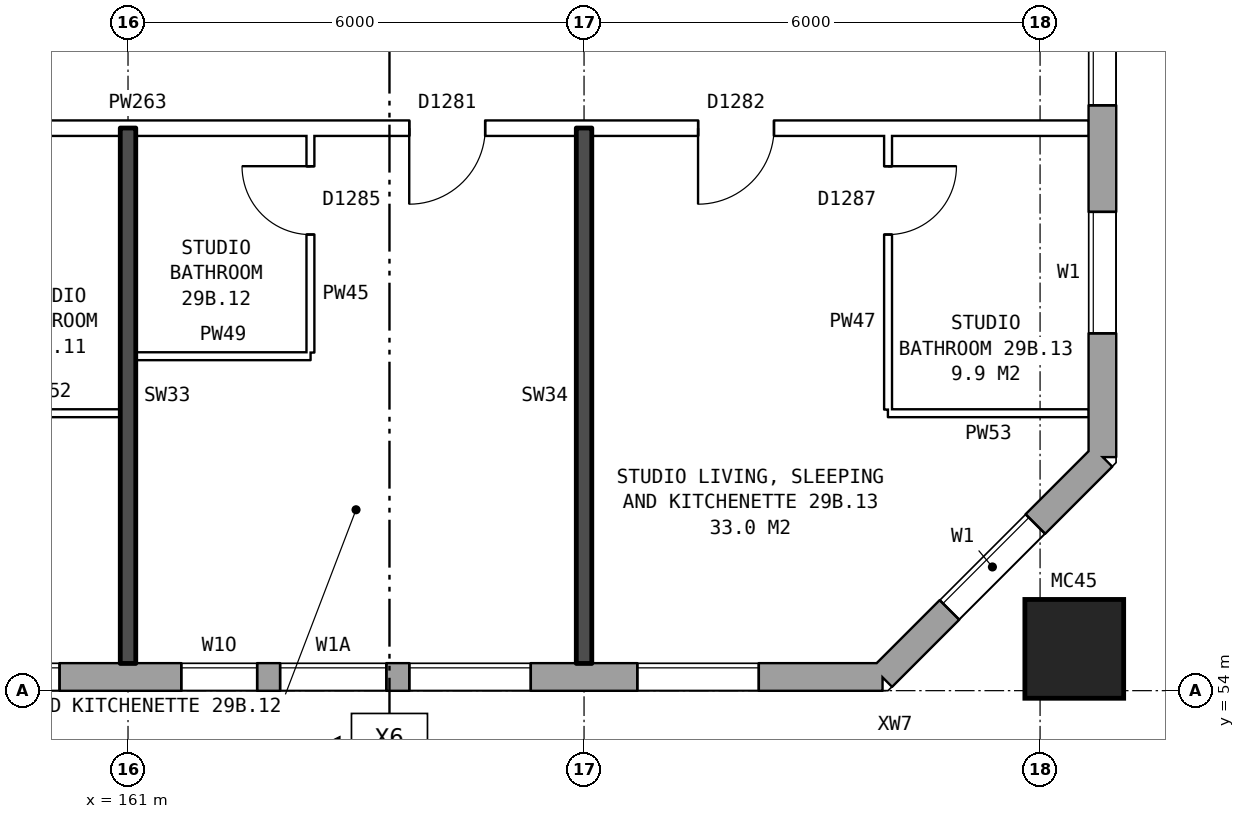
"""IFC4 building model, lengths in metres.
Left out: names, types, materials, properties, quantities, classifications, styles, units other than length and angle.
Written with IfcOpenShell. Run it as: python <this file> out.ifc"""

import sys

from ifc_helpers import new_model, si_unit, direction, frame, frame_2d, origin, origin_2d, place, context, subcontext, project, spatial, rectangle, hollow_rectangle, extrude, element, fill, save


model = new_model("IFC4")
c1 = context("Model", 3, precision=1e-05, world=origin(), true_north=direction((0.0, 1.0)))
c2 = subcontext(c1, "Body", "Model", "MODEL_VIEW")
j1 = project(units=[si_unit("LENGTHUNIT", "METRE"), si_unit("PLANEANGLEUNIT", "RADIAN")], contexts=[c1])
p1 = place(None, origin())
s1 = spatial("IfcSite", under=j1, at=p1, CompositionType="ELEMENT")
p2 = place(p1, origin())
s2 = spatial("IfcBuilding", under=s1, at=p2, CompositionType="ELEMENT")
p3 = place(p2, frame((0.0, 0.0, 105.7)))
s3 = spatial("IfcBuildingStorey", under=s2, at=p3, CompositionType="ELEMENT", Elevation=105.7)
p4 = place(p3, frame((173.45, 54.55, 0.0), z_axis=(0.0, 0.0, 1.0), x_axis=(1.0, 0.0, 0.0)))
e1 = element("IfcColumn", 1, at=p4, inside=s3, PredefinedType="COLUMN", context=c2, shape_type="SweptSolid", body=[
    extrude(hollow_rectangle(XDim=1.3, YDim=1.3, WallThickness=0.07, at=origin_2d()), origin(), (0.0, 0.0, 1.0), 3.1),
])
p5 = place(p3, frame((134.075, 54.18, 0.0), z_axis=(0.0, 0.0, 1.0), x_axis=(1.0, 0.0, 0.0)))
e2 = element("IfcWall", 2, at=p5, inside=s3, PredefinedType="STANDARD", context=c2, shape_type="SweptSolid", body=[
    extrude(rectangle(XDim=36.851, YDim=0.36, at=frame_2d((18.425, 0.0))), origin(), (0.0, 0.0, 1.0), 2.85),
])
p6 = place(p5, frame((0.625, 0.0, 0.8)))
e3 = element("IfcOpeningElement", 3, at=p6, cuts=e2, PredefinedType="OPENING", context=c2, shape_type="SweptSolid", body=[
    extrude(rectangle(XDim=1.6, YDim=1.8, at=frame_2d((0.8, 0.9))), frame((0.0, 0.19, 0.0), z_axis=(0.0, -1.0, 0.0), x_axis=(1.0, 0.0, 0.0)), (0.0, 0.0, 1.0), 0.38),
])
p7 = place(p5, frame((3.625, 0.0, 0.8)))
e4 = element("IfcOpeningElement", 4, at=p7, cuts=e2, PredefinedType="OPENING", context=c2, shape_type="SweptSolid", body=[
    extrude(rectangle(XDim=1.6, YDim=1.8, at=frame_2d((0.8, 0.9))), frame((0.0, 0.19, 0.0), z_axis=(0.0, -1.0, 0.0), x_axis=(1.0, 0.0, 0.0)), (0.0, 0.0, 1.0), 0.38),
])
p8 = place(p5, frame((6.625, 0.0, 0.8)))
e5 = element("IfcOpeningElement", 5, at=p8, cuts=e2, PredefinedType="OPENING", context=c2, shape_type="SweptSolid", body=[
    extrude(rectangle(XDim=1.6, YDim=1.8, at=frame_2d((0.8, 0.9))), frame((0.0, 0.19, 0.0), z_axis=(0.0, -1.0, 0.0), x_axis=(1.0, 0.0, 0.0)), (0.0, 0.0, 1.0), 0.38),
])
p9 = place(p5, frame((9.925, 0.0, 0.15)))
e6 = element("IfcOpeningElement", 6, at=p9, cuts=e2, PredefinedType="OPENING", context=c2, shape_type="SweptSolid", body=[
    extrude(rectangle(XDim=0.6, YDim=0.9, at=frame_2d((0.3, 0.45))), frame((0.0, 0.19, 0.0), z_axis=(0.0, -1.0, 0.0), x_axis=(1.0, 0.0, 0.0)), (0.0, 0.0, 1.0), 0.38),
])
p10 = place(p5, frame((12.625, 0.0, 0.8)))
e7 = element("IfcOpeningElement", 7, at=p10, cuts=e2, PredefinedType="OPENING", context=c2, shape_type="SweptSolid", body=[
    extrude(rectangle(XDim=1.6, YDim=1.8, at=frame_2d((0.8, 0.9))), frame((0.0, 0.19, 0.0), z_axis=(0.0, -1.0, 0.0), x_axis=(1.0, 0.0, 0.0)), (0.0, 0.0, 1.0), 0.38),
])
p11 = place(p5, frame((15.625, 0.0, 0.8)))
e8 = element("IfcOpeningElement", 8, at=p11, cuts=e2, PredefinedType="OPENING", context=c2, shape_type="SweptSolid", body=[
    extrude(rectangle(XDim=1.6, YDim=1.8, at=frame_2d((0.8, 0.9))), frame((0.0, 0.19, 0.0), z_axis=(0.0, -1.0, 0.0), x_axis=(1.0, 0.0, 0.0)), (0.0, 0.0, 1.0), 0.38),
])
p12 = place(p5, frame((18.625, 0.0, 0.8)))
e9 = element("IfcOpeningElement", 9, at=p12, cuts=e2, PredefinedType="OPENING", context=c2, shape_type="SweptSolid", body=[
    extrude(rectangle(XDim=1.6, YDim=1.8, at=frame_2d((0.8, 0.9))), frame((0.0, 0.19, 0.0), z_axis=(0.0, -1.0, 0.0), x_axis=(1.0, 0.0, 0.0)), (0.0, 0.0, 1.0), 0.38),
])
p13 = place(p5, frame((21.625, 0.0, 0.8)))
e10 = element("IfcOpeningElement", 10, at=p13, cuts=e2, PredefinedType="OPENING", context=c2, shape_type="SweptSolid", body=[
    extrude(rectangle(XDim=1.6, YDim=1.8, at=frame_2d((0.8, 0.9))), frame((0.0, 0.19, 0.0), z_axis=(0.0, -1.0, 0.0), x_axis=(1.0, 0.0, 0.0)), (0.0, 0.0, 1.0), 0.38),
])
p14 = place(p5, frame((23.525, 0.0, 0.8)))
e11 = element("IfcOpeningElement", 11, at=p14, cuts=e2, PredefinedType="OPENING", context=c2, shape_type="SweptSolid", body=[
    extrude(rectangle(XDim=1.6, YDim=1.8, at=frame_2d((0.8, 0.9))), frame((0.0, 0.19, 0.0), z_axis=(0.0, -1.0, 0.0), x_axis=(1.0, 0.0, 0.0)), (0.0, 0.0, 1.0), 0.38),
])
p15 = place(p5, frame((27.625, 0.0, 1.4)))
e12 = element("IfcOpeningElement", 12, at=p15, cuts=e2, PredefinedType="OPENING", context=c2, shape_type="SweptSolid", body=[
    extrude(rectangle(XDim=1.0, YDim=1.2, at=frame_2d((0.5, 0.6))), frame((0.0, 0.19, 0.0), z_axis=(0.0, -1.0, 0.0), x_axis=(1.0, 0.0, 0.0)), (0.0, 0.0, 1.0), 0.38),
])
p16 = place(p5, frame((30.625, 0.0, 0.8)))
e13 = element("IfcOpeningElement", 13, at=p16, cuts=e2, PredefinedType="OPENING", context=c2, shape_type="SweptSolid", body=[
    extrude(rectangle(XDim=1.6, YDim=1.8, at=frame_2d((0.8, 0.9))), frame((0.0, 0.19, 0.0), z_axis=(0.0, -1.0, 0.0), x_axis=(1.0, 0.0, 0.0)), (0.0, 0.0, 1.0), 0.38),
])
p17 = place(p5, frame((33.625, 0.0, 0.8)))
e14 = element("IfcOpeningElement", 14, at=p17, cuts=e2, PredefinedType="OPENING", context=c2, shape_type="SweptSolid", body=[
    extrude(rectangle(XDim=1.6, YDim=1.8, at=frame_2d((0.8, 0.9))), frame((0.0, 0.19, 0.0), z_axis=(0.0, -1.0, 0.0), x_axis=(1.0, 0.0, 0.0)), (0.0, 0.0, 1.0), 0.38),
])
p18 = place(p5, frame((10.975, 0.0, 0.15)))
e15 = element("IfcOpeningElement", 15, at=p18, cuts=e2, PredefinedType="OPENING", context=c2, shape_type="SweptSolid", body=[
    extrude(rectangle(XDim=0.8, YDim=1.8, at=frame_2d((0.4, 0.9))), frame((0.0, 0.19, 0.0), z_axis=(0.0, -1.0, 0.0), x_axis=(1.0, 0.0, 0.0)), (0.0, 0.0, 1.0), 0.38),
])
p19 = place(p5, frame((25.425, 0.0, 0.8)))
e16 = element("IfcOpeningElement", 16, at=p19, cuts=e2, PredefinedType="OPENING", context=c2, shape_type="SweptSolid", body=[
    extrude(rectangle(XDim=0.6, YDim=0.9, at=frame_2d((0.3, 0.45))), frame((0.0, 0.19, 0.0), z_axis=(0.0, -1.0, 0.0), x_axis=(1.0, 0.0, 0.0)), (0.0, 0.0, 1.0), 0.38),
])
p20 = place(p5, frame((28.925, 0.0, 0.8)))
e17 = element("IfcOpeningElement", 17, at=p20, cuts=e2, PredefinedType="OPENING", context=c2, shape_type="SweptSolid", body=[
    extrude(rectangle(XDim=1.4, YDim=1.8, at=frame_2d((0.7, 0.9))), frame((0.0, 0.19, 0.0), z_axis=(0.0, -1.0, 0.0), x_axis=(1.0, 0.0, 0.0)), (0.0, 0.0, 1.0), 0.38),
])
p21 = place(p3, frame((170.925, 54.18, 0.0), z_axis=(0.0, 0.0, 1.0), x_axis=(0.707106781187, 0.707106781187, 0.0)))
e18 = element("IfcWall", 18, at=p21, inside=s3, PredefinedType="STANDARD", context=c2, shape_type="SweptSolid", body=[
    extrude(rectangle(XDim=4.094, YDim=0.36, at=frame_2d((2.047, 0.0))), origin(), (0.0, 0.0, 1.0), 2.85),
])
p22 = place(p21, frame((1.247, 0.0, 0.8)))
e19 = element("IfcOpeningElement", 19, at=p22, cuts=e18, PredefinedType="OPENING", context=c2, shape_type="SweptSolid", body=[
    extrude(rectangle(XDim=1.6, YDim=1.8, at=frame_2d((0.8, 0.9))), frame((0.0, 0.19, 0.0), z_axis=(0.0, -1.0, 0.0), x_axis=(1.0, 0.0, 0.0)), (0.0, 0.0, 1.0), 0.38),
])
p23 = place(p3, frame((173.82, 57.075, 0.0), z_axis=(0.0, 0.0, 1.0), x_axis=(0.0, 1.0, 0.0)))
e20 = element("IfcWall", 20, at=p23, inside=s3, PredefinedType="STANDARD", context=c2, shape_type="SweptSolid", body=[
    extrude(rectangle(XDim=25.851, YDim=0.36, at=frame_2d((12.925, 0.0))), origin(), (0.0, 0.0, 1.0), 2.85),
])
p24 = place(p23, frame((1.625, 0.0, 0.8)))
e21 = element("IfcOpeningElement", 21, at=p24, cuts=e20, PredefinedType="OPENING", context=c2, shape_type="SweptSolid", body=[
    extrude(rectangle(XDim=1.6, YDim=1.8, at=frame_2d((0.8, 0.9))), frame((0.0, 0.19, 0.0), z_axis=(0.0, -1.0, 0.0), x_axis=(1.0, 0.0, 0.0)), (0.0, 0.0, 1.0), 0.38),
])
p25 = place(p23, frame((4.625, 0.0, 0.8)))
e22 = element("IfcOpeningElement", 22, at=p25, cuts=e20, PredefinedType="OPENING", context=c2, shape_type="SweptSolid", body=[
    extrude(rectangle(XDim=1.6, YDim=1.8, at=frame_2d((0.8, 0.9))), frame((0.0, 0.19, 0.0), z_axis=(0.0, -1.0, 0.0), x_axis=(1.0, 0.0, 0.0)), (0.0, 0.0, 1.0), 0.38),
])
p26 = place(p23, frame((6.525, 0.0, 0.8)))
e23 = element("IfcOpeningElement", 23, at=p26, cuts=e20, PredefinedType="OPENING", context=c2, shape_type="SweptSolid", body=[
    extrude(rectangle(XDim=1.6, YDim=1.5, at=frame_2d((0.8, 0.75))), frame((0.0, 0.19, 0.0), z_axis=(0.0, -1.0, 0.0), x_axis=(1.0, 0.0, 0.0)), (0.0, 0.0, 1.0), 0.38),
])
p27 = place(p23, frame((8.425, 0.0, 0.8)))
e24 = element("IfcOpeningElement", 24, at=p27, cuts=e20, PredefinedType="OPENING", context=c2, shape_type="SweptSolid", body=[
    extrude(rectangle(XDim=0.6, YDim=0.9, at=frame_2d((0.3, 0.45))), frame((0.0, 0.19, 0.0), z_axis=(0.0, -1.0, 0.0), x_axis=(1.0, 0.0, 0.0)), (0.0, 0.0, 1.0), 0.38),
])
p28 = place(p23, frame((10.275, 0.0, 1.7)))
e25 = element("IfcOpeningElement", 25, at=p28, cuts=e20, PredefinedType="OPENING", context=c2, shape_type="SweptSolid", body=[
    extrude(rectangle(XDim=0.8, YDim=0.9, at=frame_2d((0.4, 0.45))), frame((0.0, 0.19, 0.0), z_axis=(0.0, -1.0, 0.0), x_axis=(1.0, 0.0, 0.0)), (0.0, 0.0, 1.0), 0.38),
])
p29 = place(p23, frame((11.375, 0.0, 1.1)))
e26 = element("IfcOpeningElement", 26, at=p29, cuts=e20, PredefinedType="OPENING", context=c2, shape_type="SweptSolid", body=[
    extrude(rectangle(XDim=0.8, YDim=1.5, at=frame_2d((0.4, 0.75))), frame((0.0, 0.19, 0.0), z_axis=(0.0, -1.0, 0.0), x_axis=(1.0, 0.0, 0.0)), (0.0, 0.0, 1.0), 0.38),
])
p30 = place(p23, frame((19.625, 0.0, 0.8)))
e27 = element("IfcOpeningElement", 27, at=p30, cuts=e20, PredefinedType="OPENING", context=c2, shape_type="SweptSolid", body=[
    extrude(rectangle(XDim=1.6, YDim=1.8, at=frame_2d((0.8, 0.9))), frame((0.0, 0.19, 0.0), z_axis=(0.0, -1.0, 0.0), x_axis=(1.0, 0.0, 0.0)), (0.0, 0.0, 1.0), 0.38),
])
p31 = place(p23, frame((22.625, 0.0, 0.8)))
e28 = element("IfcOpeningElement", 28, at=p31, cuts=e20, PredefinedType="OPENING", context=c2, shape_type="SweptSolid", body=[
    extrude(rectangle(XDim=1.6, YDim=1.8, at=frame_2d((0.8, 0.9))), frame((0.0, 0.19, 0.0), z_axis=(0.0, -1.0, 0.0), x_axis=(1.0, 0.0, 0.0)), (0.0, 0.0, 1.0), 0.38),
])
p32 = place(p23, frame((12.475, 0.0, 0.8)))
e29 = element("IfcOpeningElement", 29, at=p32, cuts=e20, PredefinedType="OPENING", context=c2, shape_type="SweptSolid", body=[
    extrude(rectangle(XDim=1.6, YDim=1.8, at=frame_2d((0.8, 0.9))), frame((0.0, 0.19, 0.0), z_axis=(0.0, -1.0, 0.0), x_axis=(1.0, 0.0, 0.0)), (0.0, 0.0, 1.0), 0.38),
])
p33 = place(p23, frame((14.375, 0.0, 1.7)))
e30 = element("IfcOpeningElement", 30, at=p33, cuts=e20, PredefinedType="OPENING", context=c2, shape_type="SweptSolid", body=[
    extrude(rectangle(XDim=1.2, YDim=0.9, at=frame_2d((0.6, 0.45))), frame((0.0, 0.19, 0.0), z_axis=(0.0, -1.0, 0.0), x_axis=(1.0, 0.0, 0.0)), (0.0, 0.0, 1.0), 0.38),
])
p34 = place(p23, frame((16.725, 0.0, 0.8)))
e31 = element("IfcOpeningElement", 31, at=p34, cuts=e20, PredefinedType="OPENING", context=c2, shape_type="SweptSolid", body=[
    extrude(rectangle(XDim=0.6, YDim=0.9, at=frame_2d((0.3, 0.45))), frame((0.0, 0.19, 0.0), z_axis=(0.0, -1.0, 0.0), x_axis=(1.0, 0.0, 0.0)), (0.0, 0.0, 1.0), 0.38),
])
p35 = place(p23, frame((17.725, 0.0, 0.8)))
e32 = element("IfcOpeningElement", 32, at=p35, cuts=e20, PredefinedType="OPENING", context=c2, shape_type="SweptSolid", body=[
    extrude(rectangle(XDim=1.6, YDim=1.5, at=frame_2d((0.8, 0.75))), frame((0.0, 0.19, 0.0), z_axis=(0.0, -1.0, 0.0), x_axis=(1.0, 0.0, 0.0)), (0.0, 0.0, 1.0), 0.38),
])
p36 = place(p3, frame((159.0, 57.65, 0.0), z_axis=(0.0, 0.0, 1.0), x_axis=(1.0, 0.0, 0.0)))
e33 = element("IfcWall", 33, at=p36, inside=s3, PredefinedType="PARTITIONING", context=c2, shape_type="SweptSolid", body=[
    extrude(rectangle(XDim=1.9, YDim=0.1, at=frame_2d((0.95, 0.0))), origin(), (0.0, 0.0, 1.0), 2.85),
])
p37 = place(p3, frame((171.0, 57.65, 0.0), z_axis=(0.0, 0.0, 1.0), x_axis=(1.0, 0.0, 0.0)))
e34 = element("IfcWall", 34, at=p37, inside=s3, PredefinedType="PARTITIONING", context=c2, shape_type="SweptSolid", body=[
    extrude(rectangle(XDim=2.64, YDim=0.1, at=frame_2d((1.32, 0.0))), origin(), (0.0, 0.0, 1.0), 2.85),
])
p38 = place(p3, frame((161.1, 58.4, 0.0), z_axis=(0.0, 0.0, 1.0), x_axis=(1.0, 0.0, 0.0)))
e35 = element("IfcWall", 35, at=p38, inside=s3, PredefinedType="PARTITIONING", context=c2, shape_type="SweptSolid", body=[
    extrude(rectangle(XDim=2.3, YDim=0.1, at=frame_2d((1.15, 0.0))), origin(), (0.0, 0.0, 1.0), 2.85),
])
p39 = place(p3, frame((155.1, 61.4, 0.0), z_axis=(0.0, 0.0, 1.0), x_axis=(1.0, 0.0, 0.0)))
e36 = element("IfcWall", 36, at=p39, inside=s3, PredefinedType="PARTITIONING", context=c2, shape_type="SweptSolid", body=[
    extrude(rectangle(XDim=18.54, YDim=0.2, at=frame_2d((9.27, 0.0))), origin(), (0.0, 0.0, 1.0), 2.85),
])
p40 = place(p39, frame((1.45, 0.0, 0.0)))
e37 = element("IfcOpeningElement", 37, at=p40, cuts=e36, PredefinedType="OPENING", context=c2, shape_type="SweptSolid", body=[
    extrude(rectangle(XDim=1.0, YDim=2.1, at=frame_2d((0.5, 1.05))), frame((0.0, 0.11, 0.0), z_axis=(0.0, -1.0, 0.0), x_axis=(1.0, 0.0, 0.0)), (0.0, 0.0, 1.0), 0.22),
])
p41 = place(p39, frame((9.6, 0.0, 0.0)))
e38 = element("IfcOpeningElement", 38, at=p41, cuts=e36, PredefinedType="OPENING", context=c2, shape_type="SweptSolid", body=[
    extrude(rectangle(XDim=1.0, YDim=2.1, at=frame_2d((0.5, 1.05))), frame((0.0, 0.11, 0.0), z_axis=(0.0, -1.0, 0.0), x_axis=(1.0, 0.0, 0.0)), (0.0, 0.0, 1.0), 0.22),
])
p42 = place(p39, frame((13.4, 0.0, 0.0)))
e39 = element("IfcOpeningElement", 39, at=p42, cuts=e36, PredefinedType="OPENING", context=c2, shape_type="SweptSolid", body=[
    extrude(rectangle(XDim=1.0, YDim=2.1, at=frame_2d((0.5, 1.05))), frame((0.0, 0.11, 0.0), z_axis=(0.0, -1.0, 0.0), x_axis=(1.0, 0.0, 0.0)), (0.0, 0.0, 1.0), 0.22),
])
p43 = place(p3, frame((161.0, 54.36, 0.0), z_axis=(0.0, 0.0, 1.0), x_axis=(0.0, 1.0, 0.0)))
e40 = element("IfcWall", 40, at=p43, inside=s3, PredefinedType="SOLIDWALL", context=c2, shape_type="SweptSolid", body=[
    extrude(rectangle(XDim=7.04, YDim=0.2, at=frame_2d((3.52, 0.0))), origin(), (0.0, 0.0, 1.0), 2.85),
])
p44 = place(p3, frame((163.4, 58.45, 0.0), z_axis=(0.0, 0.0, 1.0), x_axis=(0.0, 1.0, 0.0)))
e41 = element("IfcWall", 41, at=p44, inside=s3, PredefinedType="PARTITIONING", context=c2, shape_type="SweptSolid", body=[
    extrude(rectangle(XDim=2.85, YDim=0.1, at=frame_2d((1.425, 0.0))), origin(), (0.0, 0.0, 1.0), 2.85),
])
p45 = place(p44, frame((1.55, 0.0, 0.0)))
e42 = element("IfcOpeningElement", 42, at=p45, cuts=e41, PredefinedType="OPENING", context=c2, shape_type="SweptSolid", body=[
    extrude(rectangle(XDim=0.9, YDim=2.1, at=frame_2d((0.45, 1.05))), frame((0.0, 0.06, 0.0), z_axis=(0.0, -1.0, 0.0), x_axis=(1.0, 0.0, 0.0)), (0.0, 0.0, 1.0), 0.12),
])
p46 = place(p3, frame((167.0, 54.36, 0.0), z_axis=(0.0, 0.0, 1.0), x_axis=(0.0, 1.0, 0.0)))
e43 = element("IfcWall", 43, at=p46, inside=s3, PredefinedType="SOLIDWALL", context=c2, shape_type="SweptSolid", body=[
    extrude(rectangle(XDim=7.04, YDim=0.2, at=frame_2d((3.52, 0.0))), origin(), (0.0, 0.0, 1.0), 2.85),
])
p47 = place(p3, frame((171.0, 57.7, 0.0), z_axis=(0.0, 0.0, 1.0), x_axis=(0.0, 1.0, 0.0)))
e44 = element("IfcWall", 44, at=p47, inside=s3, PredefinedType="PARTITIONING", context=c2, shape_type="SweptSolid", body=[
    extrude(rectangle(XDim=3.6, YDim=0.1, at=frame_2d((1.8, 0.0))), origin(), (0.0, 0.0, 1.0), 2.85),
])
p48 = place(p47, frame((2.3, 0.0, 0.0)))
e45 = element("IfcOpeningElement", 45, at=p48, cuts=e44, PredefinedType="OPENING", context=c2, shape_type="SweptSolid", body=[
    extrude(rectangle(XDim=0.9, YDim=2.1, at=frame_2d((0.45, 1.05))), frame((0.0, 0.06, 0.0), z_axis=(0.0, -1.0, 0.0), x_axis=(1.0, 0.0, 0.0)), (0.0, 0.0, 1.0), 0.12),
])
p49 = place(p15, origin())
e46 = element("IfcWindow", 46, at=p49, inside=s3, PartitioningType="SINGLE_PANEL", PredefinedType="WINDOW", context=c2, shape_type="SweptSolid", body=[
    extrude(rectangle(XDim=1.0, YDim=1.2, at=frame_2d((0.5, 0.6))), frame((0.0, 0.15, 0.0), z_axis=(0.0, -1.0, 0.0), x_axis=(1.0, 0.0, 0.0)), (0.0, 0.0, 1.0), 0.06),
])
fill(e12, e46)
p50 = place(p16, origin())
e47 = element("IfcWindow", 47, at=p50, inside=s3, PartitioningType="SINGLE_PANEL", PredefinedType="WINDOW", context=c2, shape_type="SweptSolid", body=[
    extrude(rectangle(XDim=1.6, YDim=1.8, at=frame_2d((0.8, 0.9))), frame((0.0, 0.15, 0.0), z_axis=(0.0, -1.0, 0.0), x_axis=(1.0, 0.0, 0.0)), (0.0, 0.0, 1.0), 0.06),
])
fill(e13, e47)
p51 = place(p17, origin())
e48 = element("IfcWindow", 48, at=p51, inside=s3, PartitioningType="SINGLE_PANEL", PredefinedType="WINDOW", context=c2, shape_type="SweptSolid", body=[
    extrude(rectangle(XDim=1.6, YDim=1.8, at=frame_2d((0.8, 0.9))), frame((0.0, 0.15, 0.0), z_axis=(0.0, -1.0, 0.0), x_axis=(1.0, 0.0, 0.0)), (0.0, 0.0, 1.0), 0.06),
])
fill(e14, e48)
p52 = place(p22, origin())
e49 = element("IfcWindow", 49, at=p52, inside=s3, PartitioningType="SINGLE_PANEL", PredefinedType="WINDOW", context=c2, shape_type="SweptSolid", body=[
    extrude(rectangle(XDim=1.6, YDim=1.8, at=frame_2d((0.8, 0.9))), frame((0.0, 0.15, 0.0), z_axis=(0.0, -1.0, 0.0), x_axis=(1.0, 0.0, 0.0)), (0.0, 0.0, 1.0), 0.06),
])
fill(e19, e49)
p53 = place(p24, origin())
e50 = element("IfcWindow", 50, at=p53, inside=s3, PartitioningType="SINGLE_PANEL", PredefinedType="WINDOW", context=c2, shape_type="SweptSolid", body=[
    extrude(rectangle(XDim=1.6, YDim=1.8, at=frame_2d((0.8, 0.9))), frame((0.0, 0.15, 0.0), z_axis=(0.0, -1.0, 0.0), x_axis=(1.0, 0.0, 0.0)), (0.0, 0.0, 1.0), 0.06),
])
fill(e21, e50)
p54 = place(p25, origin())
e51 = element("IfcWindow", 51, at=p54, inside=s3, PartitioningType="SINGLE_PANEL", PredefinedType="WINDOW", context=c2, shape_type="SweptSolid", body=[
    extrude(rectangle(XDim=1.6, YDim=1.8, at=frame_2d((0.8, 0.9))), frame((0.0, 0.15, 0.0), z_axis=(0.0, -1.0, 0.0), x_axis=(1.0, 0.0, 0.0)), (0.0, 0.0, 1.0), 0.06),
])
fill(e22, e51)
p55 = place(p41, frame((1.0, 0.0, 0.0), z_axis=(0.0, 0.0, 1.0), x_axis=(-1.0, 0.0, 0.0)))
e52 = element("IfcDoor", 52, at=p55, inside=s3, OperationType="SINGLE_SWING_RIGHT", PredefinedType="DOOR", context=c2, shape_type="SweptSolid", body=[
    extrude(rectangle(XDim=1.0, YDim=2.1, at=frame_2d((0.5, 1.05))), frame((0.0, 0.025, 0.0), z_axis=(0.0, -1.0, 0.0), x_axis=(1.0, 0.0, 0.0)), (0.0, 0.0, 1.0), 0.05),
])
fill(e38, e52)
p56 = place(p45, origin())
e53 = element("IfcDoor", 53, at=p56, inside=s3, OperationType="SINGLE_SWING_RIGHT", PredefinedType="DOOR", context=c2, shape_type="SweptSolid", body=[
    extrude(rectangle(XDim=0.9, YDim=2.1, at=frame_2d((0.45, 1.05))), frame((0.0, 0.025, 0.0), z_axis=(0.0, -1.0, 0.0), x_axis=(1.0, 0.0, 0.0)), (0.0, 0.0, 1.0), 0.05),
])
fill(e42, e53)
p57 = place(p42, frame((1.0, 0.0, 0.0), z_axis=(0.0, 0.0, 1.0), x_axis=(-1.0, 0.0, 0.0)))
e54 = element("IfcDoor", 54, at=p57, inside=s3, OperationType="SINGLE_SWING_RIGHT", PredefinedType="DOOR", context=c2, shape_type="SweptSolid", body=[
    extrude(rectangle(XDim=1.0, YDim=2.1, at=frame_2d((0.5, 1.05))), frame((0.0, 0.025, 0.0), z_axis=(0.0, -1.0, 0.0), x_axis=(1.0, 0.0, 0.0)), (0.0, 0.0, 1.0), 0.05),
])
fill(e39, e54)
p58 = place(p48, frame((0.9, 0.0, 0.0), z_axis=(0.0, 0.0, 1.0), x_axis=(-1.0, 0.0, 0.0)))
e55 = element("IfcDoor", 55, at=p58, inside=s3, OperationType="SINGLE_SWING_LEFT", PredefinedType="DOOR", context=c2, shape_type="SweptSolid", body=[
    extrude(rectangle(XDim=0.9, YDim=2.1, at=frame_2d((0.45, 1.05))), frame((0.0, 0.025, 0.0), z_axis=(0.0, -1.0, 0.0), x_axis=(1.0, 0.0, 0.0)), (0.0, 0.0, 1.0), 0.05),
])
fill(e45, e55)
p59 = place(p19, origin())
e56 = element("IfcWindow", 56, at=p59, inside=s3, PartitioningType="SINGLE_PANEL", PredefinedType="WINDOW", context=c2, shape_type="SweptSolid", body=[
    extrude(rectangle(XDim=0.6, YDim=0.9, at=frame_2d((0.3, 0.45))), frame((0.0, 0.15, 0.0), z_axis=(0.0, -1.0, 0.0), x_axis=(1.0, 0.0, 0.0)), (0.0, 0.0, 1.0), 0.06),
])
fill(e16, e56)
p60 = place(p20, origin())
e57 = element("IfcWindow", 57, at=p60, inside=s3, PartitioningType="SINGLE_PANEL", PredefinedType="WINDOW", context=c2, shape_type="SweptSolid", body=[
    extrude(rectangle(XDim=1.4, YDim=1.8, at=frame_2d((0.7, 0.9))), frame((0.0, 0.15, 0.0), z_axis=(0.0, -1.0, 0.0), x_axis=(1.0, 0.0, 0.0)), (0.0, 0.0, 1.0), 0.06),
])
fill(e17, e57)
save(model, sys.argv[1])
